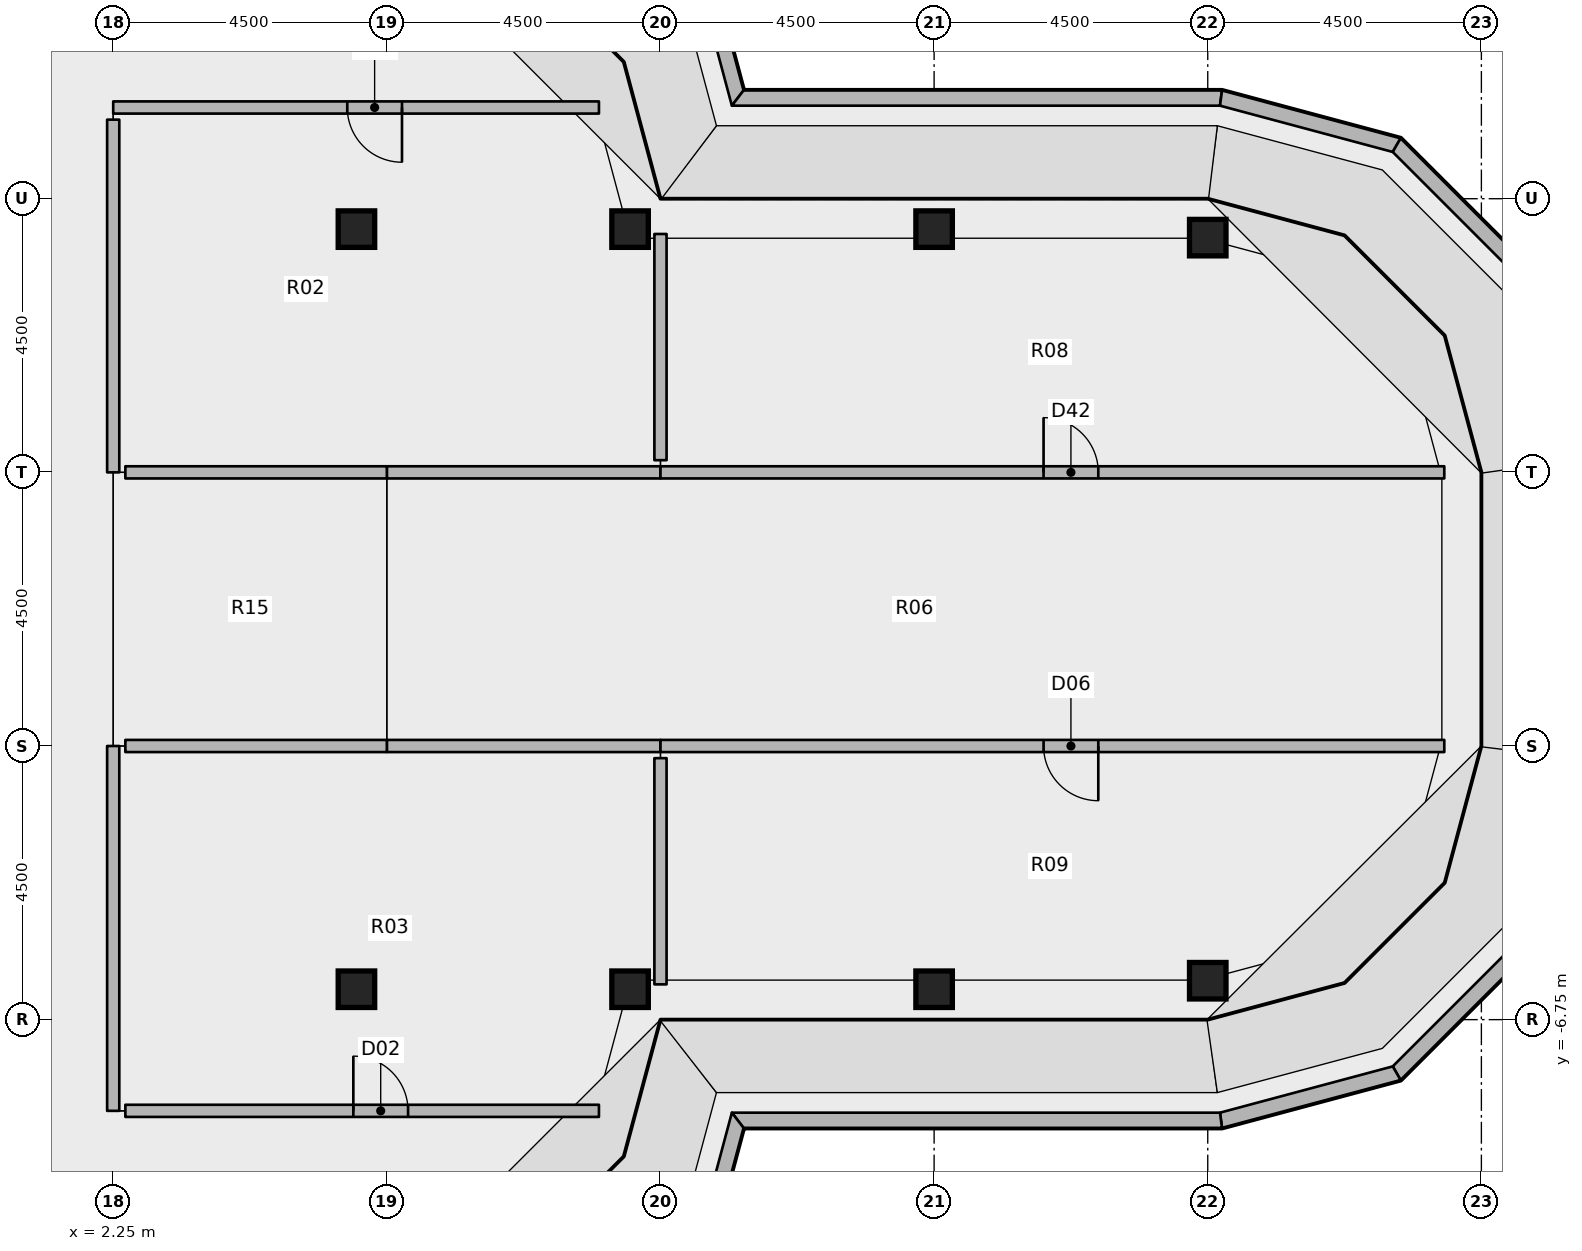
"""IFC4 building model, lengths in metres.
Left out: names, types, materials, properties, quantities, classifications, styles, units other than length and angle.
Written with IfcOpenShell. Run it as: python <this file> out.ifc"""

import sys

from ifc_helpers import new_model, si_unit, direction, frame, frame_2d, origin, origin_2d, place, context, subcontext, project, spatial, polyline, rectangle, outline, extrude, element, fill, save


model = new_model("IFC4")
c1 = context("Model", 3, precision=1e-05, world=origin(), true_north=direction((0.0, 1.0)))
c2 = subcontext(c1, "Body", "Model", "MODEL_VIEW")
j1 = project(units=[si_unit("LENGTHUNIT", "METRE"), si_unit("PLANEANGLEUNIT", "RADIAN")], contexts=[c1])
p1 = place(None, origin())
s1 = spatial("IfcSite", under=j1, at=p1, CompositionType="ELEMENT")
p2 = place(p1, origin())
s2 = spatial("IfcBuilding", under=s1, at=p2, CompositionType="ELEMENT")
p3 = place(p2, frame((0.0, 0.0, 295.2)))
s3 = spatial("IfcBuildingStorey", under=s2, at=p3, CompositionType="ELEMENT", Elevation=295.2)
for number, where, z_axis, x_axis in (
    (1, (6.25, -6.25, 0.0), (0.0, 0.0, 1.0), (1.0, 0.0, 0.0)),
    (2, (6.25, 6.25, 0.0), (0.0, 0.0, 1.0), (1.0, 0.0, 0.0)),
    (3, (10.75, -6.25, 0.0), (0.0, 0.0, 1.0), (1.0, 0.0, 0.0)),
    (4, (10.75, 6.25, 0.0), (0.0, 0.0, 1.0), (1.0, 0.0, 0.0)),
    (5, (15.75, -6.25, 0.0), (0.0, 0.0, 1.0), (1.0, 0.0, 0.0)),
    (6, (15.75, 6.25, 0.0), (0.0, 0.0, 1.0), (1.0, 0.0, 0.0)),
    (7, (20.25, -6.11, 0.0), (0.0, 0.0, 1.0), (1.0, 0.0, 0.0)),
    (8, (20.25, 6.11, 0.0), (0.0, 0.0, 1.0), (1.0, 0.0, 0.0)),
):
    element("IfcColumn", number, at=place(p3, frame(where, z_axis=z_axis, x_axis=x_axis)), inside=s3, PredefinedType="COLUMN", context=c2, shape_type="SweptSolid", body=[
        extrude(rectangle(XDim=0.6, YDim=0.6, at=origin_2d()), origin(), (0.0, 0.0, 1.0), 3.45),
    ])
p4 = place(p3, origin())
e9 = element("IfcWall", 9, at=p4, inside=s3, PredefinedType="PARAPET", context=c2, shape_type="SweptSolid", body=[
    extrude(outline(polyline([(12.243, 9.921), (12.616, 8.53), (12.424, 8.28), (12.019, 9.792), (12.243, 9.921)])), origin(), (0.0, 0.0, 1.0), 1.22),
])
p5 = place(p3, origin())
e10 = element("IfcWall", 10, at=p5, inside=s3, PredefinedType="PARAPET", context=c2, shape_type="SweptSolid", body=[
    extrude(outline(polyline([(12.616, 8.53), (20.484, 8.53), (20.451, 8.28), (12.424, 8.28), (12.616, 8.53)])), origin(), (0.0, 0.0, 1.0), 1.22),
])
p6 = place(p3, origin())
e11 = element("IfcWall", 11, at=p6, inside=s3, PredefinedType="PARAPET", context=c2, shape_type="SweptSolid", body=[
    extrude(outline(polyline([(20.484, 8.53), (23.421, 7.743), (23.292, 7.519), (20.451, 8.28), (20.484, 8.53)])), origin(), (0.0, 0.0, 1.0), 1.22),
])
p7 = place(p3, origin())
e12 = element("IfcWall", 12, at=p7, inside=s3, PredefinedType="PARAPET", context=c2, shape_type="SweptSolid", body=[
    extrude(outline(polyline([(23.421, 7.743), (25.743, 5.421), (25.519, 5.292), (23.292, 7.519), (23.421, 7.743)])), origin(), (0.0, 0.0, 1.0), 1.22),
])
p8 = place(p3, origin())
e13 = element("IfcWall", 13, at=p8, inside=s3, PredefinedType="PARAPET", context=c2, shape_type="SweptSolid", body=[
    extrude(outline(polyline([(25.743, -5.421), (23.421, -7.743), (23.292, -7.519), (25.519, -5.292), (25.743, -5.421)])), origin(), (0.0, 0.0, 1.0), 1.22),
])
p9 = place(p3, origin())
e14 = element("IfcWall", 14, at=p9, inside=s3, PredefinedType="PARAPET", context=c2, shape_type="SweptSolid", body=[
    extrude(outline(polyline([(23.421, -7.743), (20.484, -8.53), (20.451, -8.28), (23.292, -7.519), (23.421, -7.743)])), origin(), (0.0, 0.0, 1.0), 1.22),
])
p10 = place(p3, origin())
e15 = element("IfcWall", 15, at=p10, inside=s3, PredefinedType="PARAPET", context=c2, shape_type="SweptSolid", body=[
    extrude(outline(polyline([(20.484, -8.53), (12.616, -8.53), (12.424, -8.28), (20.451, -8.28), (20.484, -8.53)])), origin(), (0.0, 0.0, 1.0), 1.22),
])
p11 = place(p3, origin())
e16 = element("IfcWall", 16, at=p11, inside=s3, PredefinedType="PARAPET", context=c2, shape_type="SweptSolid", body=[
    extrude(outline(polyline([(12.616, -8.53), (12.243, -9.921), (12.019, -9.792), (12.424, -8.28), (12.616, -8.53)])), origin(), (0.0, 0.0, 1.0), 1.22),
])
p12 = place(p3, frame((10.238, 8.25, 0.0), z_axis=(0.0, 0.0, 1.0), x_axis=(-1.0, 0.0, 0.0)))
e17 = element("IfcWall", 17, at=p12, inside=s3, PredefinedType="PARTITIONING", context=c2, shape_type="SweptSolid", body=[
    extrude(rectangle(XDim=7.988, YDim=0.2, at=frame_2d((3.994, 0.0))), origin(), (0.0, 0.0, 1.0), 3.45),
])
p13 = place(p12, frame((3.239, 0.0, 0.0)))
e18 = element("IfcOpeningElement", 18, at=p13, cuts=e17, PredefinedType="OPENING", context=c2, shape_type="SweptSolid", body=[
    extrude(rectangle(XDim=0.9, YDim=2.1, at=frame_2d((0.45, 1.05))), frame((0.0, 0.11, 0.0), z_axis=(0.0, -1.0, 0.0), x_axis=(1.0, 0.0, 0.0)), (0.0, 0.0, 1.0), 0.22),
])
p14 = place(p3, frame((2.25, 8.05, 0.0), z_axis=(0.0, 0.0, 1.0), x_axis=(0.0, -1.0, 0.0)))
e19 = element("IfcWall", 19, at=p14, inside=s3, PredefinedType="PARTITIONING", context=c2, shape_type="SweptSolid", body=[
    extrude(rectangle(XDim=5.8, YDim=0.2, at=frame_2d((2.9, 0.0))), origin(), (0.0, 0.0, 1.0), 2.681),
])
p15 = place(p3, frame((2.25, -2.25, 0.0), z_axis=(0.0, 0.0, 1.0), x_axis=(0.0, -1.0, 0.0)))
e20 = element("IfcWall", 20, at=p15, inside=s3, PredefinedType="PARTITIONING", context=c2, shape_type="SweptSolid", body=[
    extrude(rectangle(XDim=6.0, YDim=0.2, at=frame_2d((3.0, 0.0))), origin(), (0.0, 0.0, 1.0), 2.681),
])
p16 = place(p3, frame((2.45, -8.25, 0.0), z_axis=(0.0, 0.0, 1.0), x_axis=(1.0, 0.0, 0.0)))
e21 = element("IfcWall", 21, at=p16, inside=s3, PredefinedType="PARTITIONING", context=c2, shape_type="SweptSolid", body=[
    extrude(rectangle(XDim=7.788, YDim=0.2, at=frame_2d((3.894, 0.0))), origin(), (0.0, 0.0, 1.0), 3.45),
])
p17 = place(p16, frame((3.749, 0.0, 0.0)))
e22 = element("IfcOpeningElement", 22, at=p17, cuts=e21, PredefinedType="OPENING", context=c2, shape_type="SweptSolid", body=[
    extrude(rectangle(XDim=0.9, YDim=2.1, at=frame_2d((0.45, 1.05))), frame((0.0, 0.11, 0.0), z_axis=(0.0, -1.0, 0.0), x_axis=(1.0, 0.0, 0.0)), (0.0, 0.0, 1.0), 0.22),
])
p18 = place(p3, frame((11.25, 2.25, 0.0), z_axis=(0.0, 0.0, 1.0), x_axis=(-1.0, 0.0, 0.0)))
e23 = element("IfcWall", 23, at=p18, inside=s3, PredefinedType="PARTITIONING", context=c2, shape_type="SweptSolid", body=[
    extrude(rectangle(XDim=4.5, YDim=0.2, at=frame_2d((2.25, 0.0))), origin(), (0.0, 0.0, 1.0), 2.53),
])
p19 = place(p3, frame((11.25, 6.17, 0.0), z_axis=(0.0, 0.0, 1.0), x_axis=(0.0, -1.0, 0.0)))
e24 = element("IfcWall", 24, at=p19, inside=s3, PredefinedType="PARTITIONING", context=c2, shape_type="SweptSolid", body=[
    extrude(rectangle(XDim=3.72, YDim=0.2, at=frame_2d((1.86, 0.0))), origin(), (0.0, 0.0, 1.0), 3.45),
])
p20 = place(p3, frame((6.75, 2.25, 0.0), z_axis=(0.0, 0.0, 1.0), x_axis=(-1.0, 0.0, 0.0)))
e25 = element("IfcWall", 25, at=p20, inside=s3, PredefinedType="PARTITIONING", context=c2, shape_type="SweptSolid", body=[
    extrude(rectangle(XDim=4.3, YDim=0.2, at=frame_2d((2.15, 0.0))), origin(), (0.0, 0.0, 1.0), 2.828),
])
p21 = place(p3, frame((6.75, -2.25, 0.0), z_axis=(0.0, 0.0, 1.0), x_axis=(1.0, 0.0, 0.0)))
e26 = element("IfcWall", 26, at=p21, inside=s3, PredefinedType="PARTITIONING", context=c2, shape_type="SweptSolid", body=[
    extrude(rectangle(XDim=4.5, YDim=0.2, at=frame_2d((2.25, 0.0))), origin(), (0.0, 0.0, 1.0), 2.53),
])
p22 = place(p3, frame((11.25, -2.45, 0.0), z_axis=(0.0, 0.0, 1.0), x_axis=(0.0, -1.0, 0.0)))
e27 = element("IfcWall", 27, at=p22, inside=s3, PredefinedType="PARTITIONING", context=c2, shape_type="SweptSolid", body=[
    extrude(rectangle(XDim=3.72, YDim=0.2, at=frame_2d((1.86, 0.0))), origin(), (0.0, 0.0, 1.0), 3.45),
])
p23 = place(p3, frame((2.45, -2.25, 0.0), z_axis=(0.0, 0.0, 1.0), x_axis=(1.0, 0.0, 0.0)))
e28 = element("IfcWall", 28, at=p23, inside=s3, PredefinedType="PARTITIONING", context=c2, shape_type="SweptSolid", body=[
    extrude(rectangle(XDim=4.3, YDim=0.2, at=frame_2d((2.15, 0.0))), origin(), (0.0, 0.0, 1.0), 2.828),
])
p24 = place(p3, frame((11.25, 2.25, 0.0), z_axis=(0.0, 0.0, 1.0), x_axis=(1.0, 0.0, 0.0)))
e29 = element("IfcWall", 29, at=p24, inside=s3, PredefinedType="PARTITIONING", context=c2, shape_type="SweptSolid", body=[
    extrude(rectangle(XDim=12.89, YDim=0.2, at=frame_2d((6.445, 0.0))), origin(), (0.0, 0.0, 1.0), 3.45),
])
p25 = place(p24, frame((6.3, 0.0, 0.0)))
e30 = element("IfcOpeningElement", 30, at=p25, cuts=e29, PredefinedType="OPENING", context=c2, shape_type="SweptSolid", body=[
    extrude(rectangle(XDim=0.9, YDim=2.1, at=frame_2d((0.45, 1.05))), frame((0.0, 0.11, 0.0), z_axis=(0.0, -1.0, 0.0), x_axis=(1.0, 0.0, 0.0)), (0.0, 0.0, 1.0), 0.22),
])
p26 = place(p3, frame((24.14, -2.25, 0.0), z_axis=(0.0, 0.0, 1.0), x_axis=(-1.0, 0.0, 0.0)))
e31 = element("IfcWall", 31, at=p26, inside=s3, PredefinedType="PARTITIONING", context=c2, shape_type="SweptSolid", body=[
    extrude(rectangle(XDim=12.89, YDim=0.2, at=frame_2d((6.445, 0.0))), origin(), (0.0, 0.0, 1.0), 3.45),
])
p27 = place(p26, frame((5.69, 0.0, 0.0)))
e32 = element("IfcOpeningElement", 32, at=p27, cuts=e31, PredefinedType="OPENING", context=c2, shape_type="SweptSolid", body=[
    extrude(rectangle(XDim=0.9, YDim=2.1, at=frame_2d((0.45, 1.05))), frame((0.0, 0.11, 0.0), z_axis=(0.0, -1.0, 0.0), x_axis=(1.0, 0.0, 0.0)), (0.0, 0.0, 1.0), 0.22),
])
p28 = place(p13, origin())
e33 = element("IfcDoor", 33, at=p28, inside=s3, OperationType="SINGLE_SWING_LEFT", PredefinedType="DOOR", context=c2, shape_type="SweptSolid", body=[
    extrude(rectangle(XDim=0.9, YDim=2.1, at=frame_2d((0.45, 1.05))), frame((0.0, 0.025, 0.0), z_axis=(0.0, -1.0, 0.0), x_axis=(1.0, 0.0, 0.0)), (0.0, 0.0, 1.0), 0.05),
])
fill(e18, e33)
p29 = place(p17, origin())
e34 = element("IfcDoor", 34, at=p29, inside=s3, OperationType="SINGLE_SWING_LEFT", PredefinedType="DOOR", context=c2, shape_type="SweptSolid", body=[
    extrude(rectangle(XDim=0.9, YDim=2.1, at=frame_2d((0.45, 1.05))), frame((0.0, 0.025, 0.0), z_axis=(0.0, -1.0, 0.0), x_axis=(1.0, 0.0, 0.0)), (0.0, 0.0, 1.0), 0.05),
])
fill(e22, e34)
p30 = place(p25, origin())
e35 = element("IfcDoor", 35, at=p30, inside=s3, OperationType="SINGLE_SWING_LEFT", PredefinedType="DOOR", context=c2, shape_type="SweptSolid", body=[
    extrude(rectangle(XDim=0.9, YDim=2.1, at=frame_2d((0.45, 1.05))), frame((0.0, 0.025, 0.0), z_axis=(0.0, -1.0, 0.0), x_axis=(1.0, 0.0, 0.0)), (0.0, 0.0, 1.0), 0.05),
])
fill(e30, e35)
p31 = place(p27, origin())
e36 = element("IfcDoor", 36, at=p31, inside=s3, OperationType="SINGLE_SWING_LEFT", PredefinedType="DOOR", context=c2, shape_type="SweptSolid", body=[
    extrude(rectangle(XDim=0.9, YDim=2.1, at=frame_2d((0.45, 1.05))), frame((0.0, 0.025, 0.0), z_axis=(0.0, -1.0, 0.0), x_axis=(1.0, 0.0, 0.0)), (0.0, 0.0, 1.0), 0.05),
])
fill(e32, e36)
save(model, sys.argv[1])
